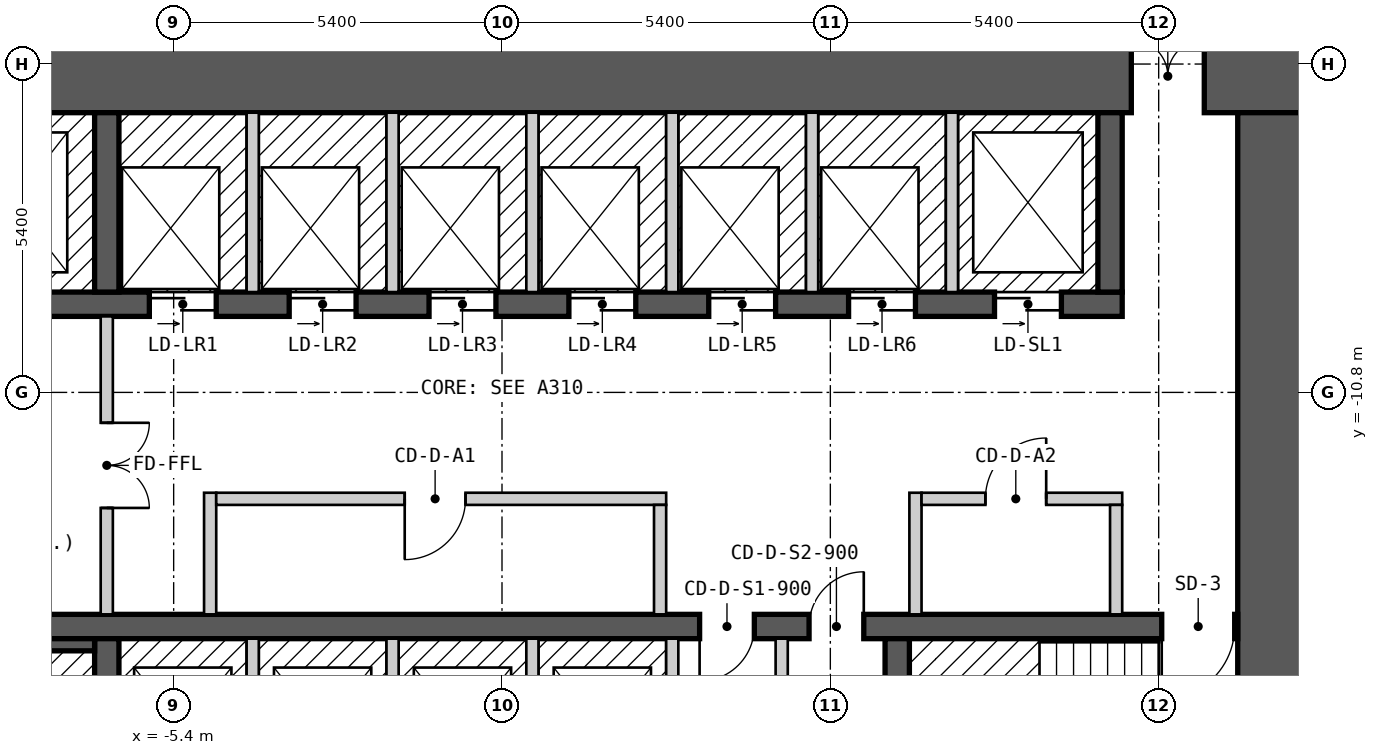
"""IFC4 building model, lengths in metres.
Left out: names, types, materials, properties, quantities, classifications, styles, units other than length and angle.
Written with IfcOpenShell. Run it as: python <this file> out.ifc"""

import sys

from ifc_helpers import new_model, si_unit, direction, frame, frame_2d, origin, place, context, subcontext, project, spatial, rectangle, extrude, element, fill, save


model = new_model("IFC4")
c1 = context("Model", 3, precision=1e-05, world=origin(), true_north=direction((0.0, 1.0)))
c2 = subcontext(c1, "Body", "Model", "MODEL_VIEW")
j1 = project(units=[si_unit("LENGTHUNIT", "METRE"), si_unit("PLANEANGLEUNIT", "RADIAN")], contexts=[c1])
p1 = place(None, origin())
s1 = spatial("IfcSite", under=j1, at=p1, CompositionType="ELEMENT")
p2 = place(p1, origin())
s2 = spatial("IfcBuilding", under=s1, at=p2, CompositionType="ELEMENT")
p3 = place(p2, frame((0.0, 0.0, 26.4)))
s3 = spatial("IfcBuildingStorey", under=s2, at=p3, CompositionType="ELEMENT", Elevation=26.4)
p4 = place(p3, frame((-13.3, -5.6, 0.0), z_axis=(0.0, 0.0, 1.0), x_axis=(1.0, 0.0, 0.0)))
e1 = element("IfcWall", 1, at=p4, inside=s3, PredefinedType="SHEAR", context=c2, shape_type="SweptSolid", body=[
    extrude(rectangle(XDim=26.6, YDim=1.2, at=frame_2d((13.3, 0.0))), origin(), (0.0, 0.0, 1.0), 2.7),
])
p5 = place(p4, frame((23.65, 0.0, 0.0)))
e2 = element("IfcOpeningElement", 2, at=p5, cuts=e1, PredefinedType="OPENING", context=c2, shape_type="SweptSolid", body=[
    extrude(rectangle(XDim=1.2, YDim=2.1, at=frame_2d((0.6, 1.05))), frame((0.0, 0.61, 0.0), z_axis=(0.0, -1.0, 0.0), x_axis=(1.0, 0.0, 0.0)), (0.0, 0.0, 1.0), 1.22),
])
p6 = place(p3, frame((12.7, -17.8, 0.0), z_axis=(0.0, 0.0, 1.0), x_axis=(0.0, 1.0, 0.0)))
e3 = element("IfcWall", 3, at=p6, inside=s3, PredefinedType="SHEAR", context=c2, shape_type="SweptSolid", body=[
    extrude(rectangle(XDim=11.6, YDim=1.2, at=frame_2d((5.8, 0.0))), origin(), (0.0, 0.0, 1.0), 2.7),
])
p7 = place(p3, frame((-12.1, -14.65, 0.0), z_axis=(0.0, 0.0, 1.0), x_axis=(1.0, 0.0, 0.0)))
e4 = element("IfcWall", 4, at=p7, inside=s3, PredefinedType="SHEAR", context=c2, shape_type="SweptSolid", body=[
    extrude(rectangle(XDim=24.2, YDim=0.4, at=frame_2d((12.1, 0.0))), origin(), (0.0, 0.0, 1.0), 2.7),
])
p8 = place(p7, frame((1.3, 0.0, 0.0), z_axis=(0.0, 0.0, 1.0), x_axis=(-1.0, 0.0, 0.0)))
e5 = element("IfcOpeningElement", 5, at=p8, cuts=e4, PredefinedType="OPENING", context=c2, shape_type="SweptSolid", body=[
    extrude(rectangle(XDim=1.2, YDim=2.1, at=frame_2d((0.6, 1.05))), frame((0.0, 0.21, 0.0), z_axis=(0.0, -1.0, 0.0), x_axis=(1.0, 0.0, 0.0)), (0.0, 0.0, 1.0), 0.42),
])
p9 = place(p7, frame((24.15, 0.0, 0.0), z_axis=(0.0, 0.0, 1.0), x_axis=(-1.0, 0.0, 0.0)))
e6 = element("IfcOpeningElement", 6, at=p9, cuts=e4, PredefinedType="OPENING", context=c2, shape_type="SweptSolid", body=[
    extrude(rectangle(XDim=1.2, YDim=2.1, at=frame_2d((0.6, 1.05))), frame((0.0, 0.21, 0.0), z_axis=(0.0, -1.0, 0.0), x_axis=(1.0, 0.0, 0.0)), (0.0, 0.0, 1.0), 0.42),
])
p10 = place(p7, frame((16.25, 0.0, 0.0), z_axis=(0.0, 0.0, 1.0), x_axis=(-1.0, 0.0, 0.0)))
e7 = element("IfcOpeningElement", 7, at=p10, cuts=e4, PredefinedType="OPENING", context=c2, shape_type="SweptSolid", body=[
    extrude(rectangle(XDim=0.9, YDim=2.1, at=frame_2d((0.45, 1.05))), frame((0.0, 0.21, 0.0), z_axis=(0.0, -1.0, 0.0), x_axis=(1.0, 0.0, 0.0)), (0.0, 0.0, 1.0), 0.42),
])
p11 = place(p7, frame((18.05, 0.0, 0.0), z_axis=(0.0, 0.0, 1.0), x_axis=(-1.0, 0.0, 0.0)))
e8 = element("IfcOpeningElement", 8, at=p11, cuts=e4, PredefinedType="OPENING", context=c2, shape_type="SweptSolid", body=[
    extrude(rectangle(XDim=0.9, YDim=2.1, at=frame_2d((0.45, 1.05))), frame((0.0, 0.21, 0.0), z_axis=(0.0, -1.0, 0.0), x_axis=(1.0, 0.0, 0.0)), (0.0, 0.0, 1.0), 0.42),
])
p12 = place(p3, frame((-12.1, -9.35, 0.0), z_axis=(0.0, 0.0, 1.0), x_axis=(1.0, 0.0, 0.0)))
e9 = element("IfcWall", 9, at=p12, inside=s3, PredefinedType="SHEAR", context=c2, shape_type="SweptSolid", body=[
    extrude(rectangle(XDim=22.3, YDim=0.4, at=frame_2d((11.15, 0.0))), origin(), (0.0, 0.0, 1.0), 2.7),
])
p13 = place(p12, frame((0.7, 0.0, 0.0)))
e10 = element("IfcOpeningElement", 10, at=p13, cuts=e9, PredefinedType="OPENING", context=c2, shape_type="SweptSolid", body=[
    extrude(rectangle(XDim=1.1, YDim=2.1, at=frame_2d((0.55, 1.05))), frame((0.0, 0.21, 0.0), z_axis=(0.0, -1.0, 0.0), x_axis=(1.0, 0.0, 0.0)), (0.0, 0.0, 1.0), 0.42),
])
p14 = place(p12, frame((3.5, 0.0, 0.0)))
e11 = element("IfcOpeningElement", 11, at=p14, cuts=e9, PredefinedType="OPENING", context=c2, shape_type="SweptSolid", body=[
    extrude(rectangle(XDim=1.1, YDim=2.1, at=frame_2d((0.55, 1.05))), frame((0.0, 0.21, 0.0), z_axis=(0.0, -1.0, 0.0), x_axis=(1.0, 0.0, 0.0)), (0.0, 0.0, 1.0), 0.42),
])
p15 = place(p12, frame((6.3, 0.0, 0.0)))
e12 = element("IfcOpeningElement", 12, at=p15, cuts=e9, PredefinedType="OPENING", context=c2, shape_type="SweptSolid", body=[
    extrude(rectangle(XDim=1.1, YDim=2.1, at=frame_2d((0.55, 1.05))), frame((0.0, 0.21, 0.0), z_axis=(0.0, -1.0, 0.0), x_axis=(1.0, 0.0, 0.0)), (0.0, 0.0, 1.0), 0.42),
])
p16 = place(p12, frame((8.6, 0.0, 0.0)))
e13 = element("IfcOpeningElement", 13, at=p16, cuts=e9, PredefinedType="OPENING", context=c2, shape_type="SweptSolid", body=[
    extrude(rectangle(XDim=1.1, YDim=2.1, at=frame_2d((0.55, 1.05))), frame((0.0, 0.21, 0.0), z_axis=(0.0, -1.0, 0.0), x_axis=(1.0, 0.0, 0.0)), (0.0, 0.0, 1.0), 0.42),
])
p17 = place(p12, frame((10.9, 0.0, 0.0)))
e14 = element("IfcOpeningElement", 14, at=p17, cuts=e9, PredefinedType="OPENING", context=c2, shape_type="SweptSolid", body=[
    extrude(rectangle(XDim=1.1, YDim=2.1, at=frame_2d((0.55, 1.05))), frame((0.0, 0.21, 0.0), z_axis=(0.0, -1.0, 0.0), x_axis=(1.0, 0.0, 0.0)), (0.0, 0.0, 1.0), 0.42),
])
p18 = place(p12, frame((13.2, 0.0, 0.0)))
e15 = element("IfcOpeningElement", 15, at=p18, cuts=e9, PredefinedType="OPENING", context=c2, shape_type="SweptSolid", body=[
    extrude(rectangle(XDim=1.1, YDim=2.1, at=frame_2d((0.55, 1.05))), frame((0.0, 0.21, 0.0), z_axis=(0.0, -1.0, 0.0), x_axis=(1.0, 0.0, 0.0)), (0.0, 0.0, 1.0), 0.42),
])
p19 = place(p12, frame((15.5, 0.0, 0.0)))
e16 = element("IfcOpeningElement", 16, at=p19, cuts=e9, PredefinedType="OPENING", context=c2, shape_type="SweptSolid", body=[
    extrude(rectangle(XDim=1.1, YDim=2.1, at=frame_2d((0.55, 1.05))), frame((0.0, 0.21, 0.0), z_axis=(0.0, -1.0, 0.0), x_axis=(1.0, 0.0, 0.0)), (0.0, 0.0, 1.0), 0.42),
])
p20 = place(p12, frame((17.8, 0.0, 0.0)))
e17 = element("IfcOpeningElement", 17, at=p20, cuts=e9, PredefinedType="OPENING", context=c2, shape_type="SweptSolid", body=[
    extrude(rectangle(XDim=1.1, YDim=2.1, at=frame_2d((0.55, 1.05))), frame((0.0, 0.21, 0.0), z_axis=(0.0, -1.0, 0.0), x_axis=(1.0, 0.0, 0.0)), (0.0, 0.0, 1.0), 0.42),
])
p21 = place(p12, frame((20.2, 0.0, 0.0)))
e18 = element("IfcOpeningElement", 18, at=p21, cuts=e9, PredefinedType="OPENING", context=c2, shape_type="SweptSolid", body=[
    extrude(rectangle(XDim=1.1, YDim=2.1, at=frame_2d((0.55, 1.05))), frame((0.0, 0.21, 0.0), z_axis=(0.0, -1.0, 0.0), x_axis=(1.0, 0.0, 0.0)), (0.0, 0.0, 1.0), 0.42),
])
for number, where, z_axis, x_axis in (
    (19, (-6.5, -17.8, 0.0), (0.0, 0.0, 1.0), (0.0, 1.0, 0.0)),
    (20, (6.5, -17.8, 0.0), (0.0, 0.0, 1.0), (0.0, 1.0, 0.0)),
    (21, (-6.5, -9.15, 0.0), (0.0, 0.0, 1.0), (0.0, 1.0, 0.0)),
    (22, (10.0, -9.15, 0.0), (0.0, 0.0, 1.0), (0.0, 1.0, 0.0)),
):
    element("IfcWall", number, at=place(p3, frame(where, z_axis=z_axis, x_axis=x_axis)), inside=s3, PredefinedType="SHEAR", context=c2, shape_type="SweptSolid", body=[
        extrude(rectangle(XDim=2.95, YDim=0.4, at=frame_2d((1.475, 0.0))), origin(), (0.0, 0.0, 1.0), 2.7),
    ])
p22 = place(p3, frame((-10.8, -14.95, 0.0), z_axis=(0.0, 0.0, 1.0), x_axis=(1.0, 0.0, 0.0)))
e23 = element("IfcWall", 23, at=p22, inside=s3, PredefinedType="SOLIDWALL", context=c2, shape_type="SweptSolid", body=[
    extrude(rectangle(XDim=4.1, YDim=0.2, at=frame_2d((2.05, 0.0))), origin(), (0.0, 0.0, 1.0), 2.7),
])
p23 = place(p3, frame((-6.5, -14.45, 0.0), z_axis=(0.0, 0.0, 1.0), x_axis=(0.0, 1.0, 0.0)))
e24 = element("IfcWall", 24, at=p23, inside=s3, PredefinedType="PARTITIONING", context=c2, shape_type="SweptSolid", body=[
    extrude(rectangle(XDim=4.9, YDim=0.2, at=frame_2d((2.45, 0.0))), origin(), (0.0, 0.0, 1.0), 2.7),
])
p24 = place(p23, frame((3.15, 0.0, 0.0), z_axis=(0.0, 0.0, 1.0), x_axis=(-1.0, 0.0, 0.0)))
e25 = element("IfcOpeningElement", 25, at=p24, cuts=e24, PredefinedType="OPENING", context=c2, shape_type="SweptSolid", body=[
    extrude(rectangle(XDim=1.4, YDim=2.1, at=frame_2d((0.7, 1.05))), frame((0.0, 0.11, 0.0), z_axis=(0.0, -1.0, 0.0), x_axis=(1.0, 0.0, 0.0)), (0.0, 0.0, 1.0), 0.22),
])
p25 = place(p3, frame((-4.8, -14.45, 0.0), z_axis=(0.0, 0.0, 1.0), x_axis=(0.0, 1.0, 0.0)))
e26 = element("IfcWall", 26, at=p25, inside=s3, PredefinedType="PARTITIONING", context=c2, shape_type="SweptSolid", body=[
    extrude(rectangle(XDim=2.0, YDim=0.2, at=frame_2d((1.0, 0.0))), origin(), (0.0, 0.0, 1.0), 2.7),
])
p26 = place(p3, frame((-4.7, -12.55, 0.0), z_axis=(0.0, 0.0, 1.0), x_axis=(1.0, 0.0, 0.0)))
e27 = element("IfcWall", 27, at=p26, inside=s3, PredefinedType="PARTITIONING", context=c2, shape_type="SweptSolid", body=[
    extrude(rectangle(XDim=7.4, YDim=0.2, at=frame_2d((3.7, 0.0))), origin(), (0.0, 0.0, 1.0), 2.7),
])
p27 = place(p26, frame((4.1, 0.0, 0.0), z_axis=(0.0, 0.0, 1.0), x_axis=(-1.0, 0.0, 0.0)))
e28 = element("IfcOpeningElement", 28, at=p27, cuts=e27, PredefinedType="OPENING", context=c2, shape_type="SweptSolid", body=[
    extrude(rectangle(XDim=1.0, YDim=2.1, at=frame_2d((0.5, 1.05))), frame((0.0, 0.11, 0.0), z_axis=(0.0, -1.0, 0.0), x_axis=(1.0, 0.0, 0.0)), (0.0, 0.0, 1.0), 0.22),
])
for number, where, z_axis, x_axis in (
    (29, (-4.1, -17.8, 0.0), (0.0, 0.0, 1.0), (0.0, 1.0, 0.0)),
    (30, (-4.1, -9.15, 0.0), (0.0, 0.0, 1.0), (0.0, 1.0, 0.0)),
    (31, (-1.8, -17.8, 0.0), (0.0, 0.0, 1.0), (0.0, 1.0, 0.0)),
    (32, (-1.8, -9.15, 0.0), (0.0, 0.0, 1.0), (0.0, 1.0, 0.0)),
    (33, (0.5, -17.8, 0.0), (0.0, 0.0, 1.0), (0.0, 1.0, 0.0)),
    (34, (0.5, -9.15, 0.0), (0.0, 0.0, 1.0), (0.0, 1.0, 0.0)),
):
    element("IfcWall", number, at=place(p3, frame(where, z_axis=z_axis, x_axis=x_axis)), inside=s3, PredefinedType="SOLIDWALL", context=c2, shape_type="SweptSolid", body=[
        extrude(rectangle(XDim=2.95, YDim=0.2, at=frame_2d((1.475, 0.0))), origin(), (0.0, 0.0, 1.0), 2.7),
    ])
p28 = place(p3, frame((2.6, -14.45, 0.0), z_axis=(0.0, 0.0, 1.0), x_axis=(0.0, 1.0, 0.0)))
e35 = element("IfcWall", 35, at=p28, inside=s3, PredefinedType="PARTITIONING", context=c2, shape_type="SweptSolid", body=[
    extrude(rectangle(XDim=1.8, YDim=0.2, at=frame_2d((0.9, 0.0))), origin(), (0.0, 0.0, 1.0), 2.7),
])
for number, where, z_axis, x_axis in (
    (36, (2.8, -17.8, 0.0), (0.0, 0.0, 1.0), (0.0, 1.0, 0.0)),
    (37, (2.8, -9.15, 0.0), (0.0, 0.0, 1.0), (0.0, 1.0, 0.0)),
):
    element("IfcWall", number, at=place(p3, frame(where, z_axis=z_axis, x_axis=x_axis)), inside=s3, PredefinedType="SOLIDWALL", context=c2, shape_type="SweptSolid", body=[
        extrude(rectangle(XDim=2.95, YDim=0.2, at=frame_2d((1.475, 0.0))), origin(), (0.0, 0.0, 1.0), 2.7),
    ])
p29 = place(p3, frame((4.6, -17.8, 0.0), z_axis=(0.0, 0.0, 1.0), x_axis=(0.0, 1.0, 0.0)))
e38 = element("IfcWall", 38, at=p29, inside=s3, PredefinedType="PARTITIONING", context=c2, shape_type="SweptSolid", body=[
    extrude(rectangle(XDim=2.95, YDim=0.2, at=frame_2d((1.475, 0.0))), origin(), (0.0, 0.0, 1.0), 2.7),
])
p30 = place(p3, frame((5.1, -9.15, 0.0), z_axis=(0.0, 0.0, 1.0), x_axis=(0.0, 1.0, 0.0)))
e39 = element("IfcWall", 39, at=p30, inside=s3, PredefinedType="SOLIDWALL", context=c2, shape_type="SweptSolid", body=[
    extrude(rectangle(XDim=2.95, YDim=0.2, at=frame_2d((1.475, 0.0))), origin(), (0.0, 0.0, 1.0), 2.7),
])
p31 = place(p3, frame((6.8, -14.45, 0.0), z_axis=(0.0, 0.0, 1.0), x_axis=(0.0, 1.0, 0.0)))
e40 = element("IfcWall", 40, at=p31, inside=s3, PredefinedType="PARTITIONING", context=c2, shape_type="SweptSolid", body=[
    extrude(rectangle(XDim=2.0, YDim=0.2, at=frame_2d((1.0, 0.0))), origin(), (0.0, 0.0, 1.0), 2.7),
])
p32 = place(p3, frame((6.9, -12.55, 0.0), z_axis=(0.0, 0.0, 1.0), x_axis=(1.0, 0.0, 0.0)))
e41 = element("IfcWall", 41, at=p32, inside=s3, PredefinedType="PARTITIONING", context=c2, shape_type="SweptSolid", body=[
    extrude(rectangle(XDim=3.3, YDim=0.2, at=frame_2d((1.65, 0.0))), origin(), (0.0, 0.0, 1.0), 2.7),
])
p33 = place(p32, frame((2.05, 0.0, 0.0), z_axis=(0.0, 0.0, 1.0), x_axis=(-1.0, 0.0, 0.0)))
e42 = element("IfcOpeningElement", 42, at=p33, cuts=e41, PredefinedType="OPENING", context=c2, shape_type="SweptSolid", body=[
    extrude(rectangle(XDim=1.0, YDim=2.1, at=frame_2d((0.5, 1.05))), frame((0.0, 0.11, 0.0), z_axis=(0.0, -1.0, 0.0), x_axis=(1.0, 0.0, 0.0)), (0.0, 0.0, 1.0), 0.22),
])
p34 = place(p3, frame((7.4, -9.15, 0.0), z_axis=(0.0, 0.0, 1.0), x_axis=(0.0, 1.0, 0.0)))
e43 = element("IfcWall", 43, at=p34, inside=s3, PredefinedType="SOLIDWALL", context=c2, shape_type="SweptSolid", body=[
    extrude(rectangle(XDim=2.95, YDim=0.2, at=frame_2d((1.475, 0.0))), origin(), (0.0, 0.0, 1.0), 2.7),
])
p35 = place(p3, frame((10.1, -14.45, 0.0), z_axis=(0.0, 0.0, 1.0), x_axis=(0.0, 1.0, 0.0)))
e44 = element("IfcWall", 44, at=p35, inside=s3, PredefinedType="PARTITIONING", context=c2, shape_type="SweptSolid", body=[
    extrude(rectangle(XDim=1.8, YDim=0.2, at=frame_2d((0.9, 0.0))), origin(), (0.0, 0.0, 1.0), 2.7),
])
p36 = place(p15, origin())
e45 = element("IfcDoor", 45, at=p36, inside=s3, OperationType="DOUBLE_DOOR_SLIDING", PredefinedType="DOOR", context=c2, shape_type="SweptSolid", body=[
    extrude(rectangle(XDim=1.1, YDim=2.1, at=frame_2d((0.55, 1.05))), frame((0.0, 0.025, 0.0), z_axis=(0.0, -1.0, 0.0), x_axis=(1.0, 0.0, 0.0)), (0.0, 0.0, 1.0), 0.05),
])
fill(e12, e45)
p37 = place(p16, origin())
e46 = element("IfcDoor", 46, at=p37, inside=s3, OperationType="DOUBLE_DOOR_SLIDING", PredefinedType="DOOR", context=c2, shape_type="SweptSolid", body=[
    extrude(rectangle(XDim=1.1, YDim=2.1, at=frame_2d((0.55, 1.05))), frame((0.0, 0.025, 0.0), z_axis=(0.0, -1.0, 0.0), x_axis=(1.0, 0.0, 0.0)), (0.0, 0.0, 1.0), 0.05),
])
fill(e13, e46)
p38 = place(p17, origin())
e47 = element("IfcDoor", 47, at=p38, inside=s3, OperationType="DOUBLE_DOOR_SLIDING", PredefinedType="DOOR", context=c2, shape_type="SweptSolid", body=[
    extrude(rectangle(XDim=1.1, YDim=2.1, at=frame_2d((0.55, 1.05))), frame((0.0, 0.025, 0.0), z_axis=(0.0, -1.0, 0.0), x_axis=(1.0, 0.0, 0.0)), (0.0, 0.0, 1.0), 0.05),
])
fill(e14, e47)
p39 = place(p18, origin())
e48 = element("IfcDoor", 48, at=p39, inside=s3, OperationType="DOUBLE_DOOR_SLIDING", PredefinedType="DOOR", context=c2, shape_type="SweptSolid", body=[
    extrude(rectangle(XDim=1.1, YDim=2.1, at=frame_2d((0.55, 1.05))), frame((0.0, 0.025, 0.0), z_axis=(0.0, -1.0, 0.0), x_axis=(1.0, 0.0, 0.0)), (0.0, 0.0, 1.0), 0.05),
])
fill(e15, e48)
p40 = place(p19, origin())
e49 = element("IfcDoor", 49, at=p40, inside=s3, OperationType="DOUBLE_DOOR_SLIDING", PredefinedType="DOOR", context=c2, shape_type="SweptSolid", body=[
    extrude(rectangle(XDim=1.1, YDim=2.1, at=frame_2d((0.55, 1.05))), frame((0.0, 0.025, 0.0), z_axis=(0.0, -1.0, 0.0), x_axis=(1.0, 0.0, 0.0)), (0.0, 0.0, 1.0), 0.05),
])
fill(e16, e49)
p41 = place(p20, origin())
e50 = element("IfcDoor", 50, at=p41, inside=s3, OperationType="DOUBLE_DOOR_SLIDING", PredefinedType="DOOR", context=c2, shape_type="SweptSolid", body=[
    extrude(rectangle(XDim=1.1, YDim=2.1, at=frame_2d((0.55, 1.05))), frame((0.0, 0.025, 0.0), z_axis=(0.0, -1.0, 0.0), x_axis=(1.0, 0.0, 0.0)), (0.0, 0.0, 1.0), 0.05),
])
fill(e17, e50)
p42 = place(p21, origin())
e51 = element("IfcDoor", 51, at=p42, inside=s3, OperationType="DOUBLE_DOOR_SLIDING", PredefinedType="DOOR", context=c2, shape_type="SweptSolid", body=[
    extrude(rectangle(XDim=1.1, YDim=2.1, at=frame_2d((0.55, 1.05))), frame((0.0, 0.025, 0.0), z_axis=(0.0, -1.0, 0.0), x_axis=(1.0, 0.0, 0.0)), (0.0, 0.0, 1.0), 0.05),
])
fill(e18, e51)
p43 = place(p9, origin())
e52 = element("IfcDoor", 52, at=p43, inside=s3, OperationType="SINGLE_SWING_RIGHT", PredefinedType="DOOR", context=c2, shape_type="SweptSolid", body=[
    extrude(rectangle(XDim=1.2, YDim=2.1, at=frame_2d((0.6, 1.05))), frame((0.0, 0.025, 0.0), z_axis=(0.0, -1.0, 0.0), x_axis=(1.0, 0.0, 0.0)), (0.0, 0.0, 1.0), 0.05),
])
fill(e6, e52)
p44 = place(p24, origin())
e53 = element("IfcDoor", 53, at=p44, inside=s3, OperationType="DOUBLE_DOOR_SINGLE_SWING", PredefinedType="DOOR", context=c2, shape_type="SweptSolid", body=[
    extrude(rectangle(XDim=1.4, YDim=2.1, at=frame_2d((0.7, 1.05))), frame((0.0, 0.025, 0.0), z_axis=(0.0, -1.0, 0.0), x_axis=(1.0, 0.0, 0.0)), (0.0, 0.0, 1.0), 0.05),
])
fill(e25, e53)
p45 = place(p5, origin())
e54 = element("IfcDoor", 54, at=p45, inside=s3, OperationType="DOUBLE_DOOR_SINGLE_SWING", PredefinedType="DOOR", context=c2, shape_type="SweptSolid", body=[
    extrude(rectangle(XDim=1.2, YDim=2.1, at=frame_2d((0.6, 1.05))), frame((0.0, 0.025, 0.0), z_axis=(0.0, -1.0, 0.0), x_axis=(1.0, 0.0, 0.0)), (0.0, 0.0, 1.0), 0.05),
])
fill(e2, e54)
p46 = place(p27, origin())
e55 = element("IfcDoor", 55, at=p46, inside=s3, OperationType="SINGLE_SWING_RIGHT", PredefinedType="DOOR", context=c2, shape_type="SweptSolid", body=[
    extrude(rectangle(XDim=1.0, YDim=2.1, at=frame_2d((0.5, 1.05))), frame((0.0, 0.025, 0.0), z_axis=(0.0, -1.0, 0.0), x_axis=(1.0, 0.0, 0.0)), (0.0, 0.0, 1.0), 0.05),
])
fill(e28, e55)
p47 = place(p33, origin())
e56 = element("IfcDoor", 56, at=p47, inside=s3, OperationType="SINGLE_SWING_LEFT", PredefinedType="DOOR", context=c2, shape_type="SweptSolid", body=[
    extrude(rectangle(XDim=1.0, YDim=2.1, at=frame_2d((0.5, 1.05))), frame((0.0, 0.025, 0.0), z_axis=(0.0, -1.0, 0.0), x_axis=(1.0, 0.0, 0.0)), (0.0, 0.0, 1.0), 0.05),
])
fill(e42, e56)
p48 = place(p10, origin())
e57 = element("IfcDoor", 57, at=p48, inside=s3, OperationType="SINGLE_SWING_RIGHT", PredefinedType="DOOR", context=c2, shape_type="SweptSolid", body=[
    extrude(rectangle(XDim=0.9, YDim=2.1, at=frame_2d((0.45, 1.05))), frame((0.0, 0.025, 0.0), z_axis=(0.0, -1.0, 0.0), x_axis=(1.0, 0.0, 0.0)), (0.0, 0.0, 1.0), 0.05),
])
fill(e7, e57)
p49 = place(p11, origin())
e58 = element("IfcDoor", 58, at=p49, inside=s3, OperationType="SINGLE_SWING_LEFT", PredefinedType="DOOR", context=c2, shape_type="SweptSolid", body=[
    extrude(rectangle(XDim=0.9, YDim=2.1, at=frame_2d((0.45, 1.05))), frame((0.0, 0.025, 0.0), z_axis=(0.0, -1.0, 0.0), x_axis=(1.0, 0.0, 0.0)), (0.0, 0.0, 1.0), 0.05),
])
fill(e8, e58)
save(model, sys.argv[1])
